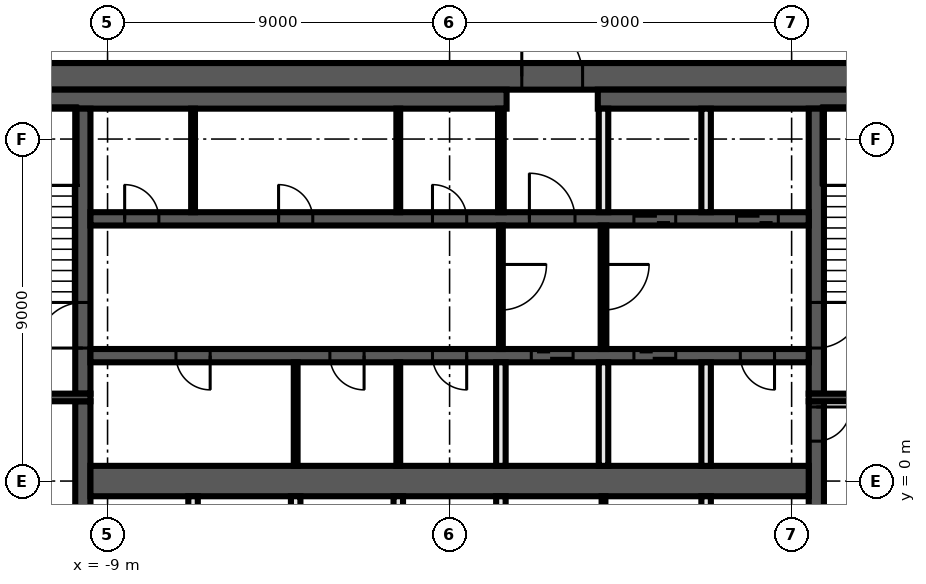
"""IFC4 building model, lengths in metres.
Left out: names, types, materials, properties, quantities, classifications, styles, units other than length and angle.
Written with IfcOpenShell. Run it as: python <this file> out.ifc"""

import sys

from ifc_helpers import new_model, si_unit, direction, frame, frame_2d, origin, place, context, subcontext, project, spatial, rectangle, extrude, element, fill, save


model = new_model("IFC4")
c1 = context("Model", 3, precision=1e-05, world=origin(), true_north=direction((0.0, 1.0)))
c2 = subcontext(c1, "Body", "Model", "MODEL_VIEW")
j1 = project(units=[si_unit("LENGTHUNIT", "METRE"), si_unit("PLANEANGLEUNIT", "RADIAN")], contexts=[c1])
p1 = place(None, origin())
s1 = spatial("IfcSite", under=j1, at=p1, CompositionType="ELEMENT")
p2 = place(p1, origin())
s2 = spatial("IfcBuilding", under=s1, at=p2, CompositionType="ELEMENT")
p3 = place(p2, frame((0.0, 0.0, 279.0)))
s3 = spatial("IfcBuildingStorey", under=s2, at=p3, CompositionType="ELEMENT", Elevation=279.0)
p4 = place(p3, frame((-14.0, 10.65, 0.0), z_axis=(0.0, 0.0, 1.0), x_axis=(1.0, 0.0, 0.0)))
e1 = element("IfcWall", 1, at=p4, inside=s3, PredefinedType="SHEAR", context=c2, shape_type="SweptSolid", body=[
    extrude(rectangle(XDim=28.0, YDim=0.7, at=frame_2d((14.0, 0.0))), origin(), (0.0, 0.0, 1.0), 3.6),
])
p5 = place(p4, frame((15.9, 0.0, 0.0)))
e2 = element("IfcOpeningElement", 2, at=p5, cuts=e1, PredefinedType="OPENING", context=c2, shape_type="SweptSolid", body=[
    extrude(rectangle(XDim=1.6, YDim=2.1, at=frame_2d((0.8, 1.05))), frame((0.0, 0.36, 0.0), z_axis=(0.0, -1.0, 0.0), x_axis=(1.0, 0.0, 0.0)), (0.0, 0.0, 1.0), 0.72),
])
p6 = place(p3, frame((-13.3, 10.05, 0.0), z_axis=(0.0, 0.0, 1.0), x_axis=(1.0, 0.0, 0.0)))
e3 = element("IfcWall", 3, at=p6, inside=s3, PredefinedType="SHEAR", context=c2, shape_type="SweptSolid", body=[
    extrude(rectangle(XDim=14.8, YDim=0.5, at=frame_2d((7.4, 0.0))), origin(), (0.0, 0.0, 1.0), 3.6),
])
p7 = place(p3, frame((3.9, 10.05, 0.0), z_axis=(0.0, 0.0, 1.0), x_axis=(1.0, 0.0, 0.0)))
e4 = element("IfcWall", 4, at=p7, inside=s3, PredefinedType="SHEAR", context=c2, shape_type="SweptSolid", body=[
    extrude(rectangle(XDim=9.4, YDim=0.5, at=frame_2d((4.7, 0.0))), origin(), (0.0, 0.0, 1.0), 3.6),
])
p8 = place(p3, frame((9.65, 2.1, 0.0), z_axis=(0.0, 0.0, 1.0), x_axis=(0.0, -1.0, 0.0)))
e5 = element("IfcWall", 5, at=p8, inside=s3, PredefinedType="SHEAR", context=c2, shape_type="SweptSolid", body=[
    extrude(rectangle(XDim=4.2, YDim=0.4, at=frame_2d((2.1, 0.0))), origin(), (0.0, 0.0, 1.0), 3.6),
])
p9 = place(p8, frame((0.15, 0.0, 0.0)))
e6 = element("IfcOpeningElement", 6, at=p9, cuts=e5, PredefinedType="OPENING", context=c2, shape_type="SweptSolid", body=[
    extrude(rectangle(XDim=0.9, YDim=2.1, at=frame_2d((0.45, 1.05))), frame((0.0, 0.21, 0.0), z_axis=(0.0, -1.0, 0.0), x_axis=(1.0, 0.0, 0.0)), (0.0, 0.0, 1.0), 0.42),
])
p10 = place(p3, frame((9.65, 9.8, 0.0), z_axis=(0.0, 0.0, 1.0), x_axis=(0.0, -1.0, 0.0)))
e7 = element("IfcWall", 7, at=p10, inside=s3, PredefinedType="SHEAR", context=c2, shape_type="SweptSolid", body=[
    extrude(rectangle(XDim=7.5, YDim=0.4, at=frame_2d((3.75, 0.0))), origin(), (0.0, 0.0, 1.0), 3.6),
])
p11 = place(p10, frame((5.1, 0.0, 0.0)))
e8 = element("IfcOpeningElement", 8, at=p11, cuts=e7, PredefinedType="OPENING", context=c2, shape_type="SweptSolid", body=[
    extrude(rectangle(XDim=1.2, YDim=2.1, at=frame_2d((0.6, 1.05))), frame((0.0, 0.21, 0.0), z_axis=(0.0, -1.0, 0.0), x_axis=(1.0, 0.0, 0.0)), (0.0, 0.0, 1.0), 0.42),
])
p12 = place(p3, frame((-9.65, -2.1, 0.0), z_axis=(0.0, 0.0, 1.0), x_axis=(0.0, 1.0, 0.0)))
e9 = element("IfcWall", 9, at=p12, inside=s3, PredefinedType="SHEAR", context=c2, shape_type="SweptSolid", body=[
    extrude(rectangle(XDim=4.2, YDim=0.4, at=frame_2d((2.1, 0.0))), origin(), (0.0, 0.0, 1.0), 3.6),
])
p13 = place(p3, frame((-9.65, 2.3, 0.0), z_axis=(0.0, 0.0, 1.0), x_axis=(0.0, 1.0, 0.0)))
e10 = element("IfcWall", 10, at=p13, inside=s3, PredefinedType="SHEAR", context=c2, shape_type="SweptSolid", body=[
    extrude(rectangle(XDim=7.5, YDim=0.4, at=frame_2d((3.75, 0.0))), origin(), (0.0, 0.0, 1.0), 3.6),
])
p14 = place(p13, frame((1.2, 0.0, 0.0)))
e11 = element("IfcOpeningElement", 11, at=p14, cuts=e10, PredefinedType="OPENING", context=c2, shape_type="SweptSolid", body=[
    extrude(rectangle(XDim=1.2, YDim=2.1, at=frame_2d((0.6, 1.05))), frame((0.0, 0.21, 0.0), z_axis=(0.0, -1.0, 0.0), x_axis=(1.0, 0.0, 0.0)), (0.0, 0.0, 1.0), 0.42),
])
for number, where, z_axis, x_axis in (
    (12, (9.45, 2.2, 0.0), (0.0, 0.0, 1.0), (1.0, 0.0, 0.0)),
    (13, (-9.45, 2.2, 0.0), (0.0, 0.0, 1.0), (-1.0, 0.0, 0.0)),
):
    element("IfcWall", number, at=place(p3, frame(where, z_axis=z_axis, x_axis=x_axis)), inside=s3, PredefinedType="SHEAR", context=c2, shape_type="SweptSolid", body=[
        extrude(rectangle(XDim=3.35, YDim=0.2, at=frame_2d((1.675, 0.0))), origin(), (0.0, 0.0, 1.0), 3.6),
    ])
p15 = place(p3, frame((-9.45, 6.9, 0.0), z_axis=(0.0, 0.0, 1.0), x_axis=(1.0, 0.0, 0.0)))
e14 = element("IfcWall", 14, at=p15, inside=s3, PredefinedType="SHEAR", context=c2, shape_type="SweptSolid", body=[
    extrude(rectangle(XDim=18.9, YDim=0.35, at=frame_2d((9.45, 0.0))), origin(), (0.0, 0.0, 1.0), 3.6),
])
p16 = place(p15, frame((11.55, 0.0, 0.0)))
e15 = element("IfcOpeningElement", 15, at=p16, cuts=e14, PredefinedType="OPENING", context=c2, shape_type="SweptSolid", body=[
    extrude(rectangle(XDim=1.2, YDim=2.1, at=frame_2d((0.6, 1.05))), frame((0.0, 0.185, 0.0), z_axis=(0.0, -1.0, 0.0), x_axis=(1.0, 0.0, 0.0)), (0.0, 0.0, 1.0), 0.37),
])
p17 = place(p15, frame((14.3, 0.0, 0.0)))
e16 = element("IfcOpeningElement", 16, at=p17, cuts=e14, PredefinedType="OPENING", context=c2, shape_type="SweptSolid", body=[
    extrude(rectangle(XDim=1.1, YDim=2.1, at=frame_2d((0.55, 1.05))), frame((0.0, 0.185, 0.0), z_axis=(0.0, -1.0, 0.0), x_axis=(1.0, 0.0, 0.0)), (0.0, 0.0, 1.0), 0.37),
])
p18 = place(p15, frame((17.0, 0.0, 0.0)))
e17 = element("IfcOpeningElement", 17, at=p18, cuts=e14, PredefinedType="OPENING", context=c2, shape_type="SweptSolid", body=[
    extrude(rectangle(XDim=1.1, YDim=2.1, at=frame_2d((0.55, 1.05))), frame((0.0, 0.185, 0.0), z_axis=(0.0, -1.0, 0.0), x_axis=(1.0, 0.0, 0.0)), (0.0, 0.0, 1.0), 0.37),
])
p19 = place(p15, frame((0.9, 0.0, 0.0)))
e18 = element("IfcOpeningElement", 18, at=p19, cuts=e14, PredefinedType="OPENING", context=c2, shape_type="SweptSolid", body=[
    extrude(rectangle(XDim=0.9, YDim=2.1, at=frame_2d((0.45, 1.05))), frame((0.0, 0.185, 0.0), z_axis=(0.0, -1.0, 0.0), x_axis=(1.0, 0.0, 0.0)), (0.0, 0.0, 1.0), 0.37),
])
p20 = place(p15, frame((4.95, 0.0, 0.0)))
e19 = element("IfcOpeningElement", 19, at=p20, cuts=e14, PredefinedType="OPENING", context=c2, shape_type="SweptSolid", body=[
    extrude(rectangle(XDim=0.9, YDim=2.1, at=frame_2d((0.45, 1.05))), frame((0.0, 0.185, 0.0), z_axis=(0.0, -1.0, 0.0), x_axis=(1.0, 0.0, 0.0)), (0.0, 0.0, 1.0), 0.37),
])
p21 = place(p15, frame((9.0, 0.0, 0.0)))
e20 = element("IfcOpeningElement", 20, at=p21, cuts=e14, PredefinedType="OPENING", context=c2, shape_type="SweptSolid", body=[
    extrude(rectangle(XDim=0.9, YDim=2.1, at=frame_2d((0.45, 1.05))), frame((0.0, 0.185, 0.0), z_axis=(0.0, -1.0, 0.0), x_axis=(1.0, 0.0, 0.0)), (0.0, 0.0, 1.0), 0.37),
])
p22 = place(p3, frame((9.45, 3.3, 0.0), z_axis=(0.0, 0.0, 1.0), x_axis=(-1.0, 0.0, 0.0)))
e21 = element("IfcWall", 21, at=p22, inside=s3, PredefinedType="SHEAR", context=c2, shape_type="SweptSolid", body=[
    extrude(rectangle(XDim=18.9, YDim=0.35, at=frame_2d((9.45, 0.0))), origin(), (0.0, 0.0, 1.0), 3.6),
])
p23 = place(p22, frame((6.2, 0.0, 0.0)))
e22 = element("IfcOpeningElement", 22, at=p23, cuts=e21, PredefinedType="OPENING", context=c2, shape_type="SweptSolid", body=[
    extrude(rectangle(XDim=1.1, YDim=2.1, at=frame_2d((0.55, 1.05))), frame((0.0, 0.185, 0.0), z_axis=(0.0, -1.0, 0.0), x_axis=(1.0, 0.0, 0.0)), (0.0, 0.0, 1.0), 0.37),
])
p24 = place(p22, frame((3.5, 0.0, 0.0)))
e23 = element("IfcOpeningElement", 23, at=p24, cuts=e21, PredefinedType="OPENING", context=c2, shape_type="SweptSolid", body=[
    extrude(rectangle(XDim=1.1, YDim=2.1, at=frame_2d((0.55, 1.05))), frame((0.0, 0.185, 0.0), z_axis=(0.0, -1.0, 0.0), x_axis=(1.0, 0.0, 0.0)), (0.0, 0.0, 1.0), 0.37),
])
p25 = place(p22, frame((0.9, 0.0, 0.0)))
e24 = element("IfcOpeningElement", 24, at=p25, cuts=e21, PredefinedType="OPENING", context=c2, shape_type="SweptSolid", body=[
    extrude(rectangle(XDim=0.9, YDim=2.1, at=frame_2d((0.45, 1.05))), frame((0.0, 0.185, 0.0), z_axis=(0.0, -1.0, 0.0), x_axis=(1.0, 0.0, 0.0)), (0.0, 0.0, 1.0), 0.37),
])
p26 = place(p22, frame((15.75, 0.0, 0.0)))
e25 = element("IfcOpeningElement", 25, at=p26, cuts=e21, PredefinedType="OPENING", context=c2, shape_type="SweptSolid", body=[
    extrude(rectangle(XDim=0.9, YDim=2.1, at=frame_2d((0.45, 1.05))), frame((0.0, 0.185, 0.0), z_axis=(0.0, -1.0, 0.0), x_axis=(1.0, 0.0, 0.0)), (0.0, 0.0, 1.0), 0.37),
])
p27 = place(p22, frame((11.7, 0.0, 0.0)))
e26 = element("IfcOpeningElement", 26, at=p27, cuts=e21, PredefinedType="OPENING", context=c2, shape_type="SweptSolid", body=[
    extrude(rectangle(XDim=0.9, YDim=2.1, at=frame_2d((0.45, 1.05))), frame((0.0, 0.185, 0.0), z_axis=(0.0, -1.0, 0.0), x_axis=(1.0, 0.0, 0.0)), (0.0, 0.0, 1.0), 0.37),
])
p28 = place(p22, frame((9.0, 0.0, 0.0)))
e27 = element("IfcOpeningElement", 27, at=p28, cuts=e21, PredefinedType="OPENING", context=c2, shape_type="SweptSolid", body=[
    extrude(rectangle(XDim=0.9, YDim=2.1, at=frame_2d((0.45, 1.05))), frame((0.0, 0.185, 0.0), z_axis=(0.0, -1.0, 0.0), x_axis=(1.0, 0.0, 0.0)), (0.0, 0.0, 1.0), 0.37),
])
p29 = place(p3, frame((-9.45, 0.0, 0.0), z_axis=(0.0, 0.0, 1.0), x_axis=(1.0, 0.0, 0.0)))
e28 = element("IfcWall", 28, at=p29, inside=s3, PredefinedType="SHEAR", context=c2, shape_type="SweptSolid", body=[
    extrude(rectangle(XDim=18.9, YDim=0.8, at=frame_2d((9.45, 0.0))), origin(), (0.0, 0.0, 1.0), 3.6),
])
for number, where, z_axis, x_axis in (
    (29, (6.75, -3.125, 0.0), (0.0, 0.0, 1.0), (0.0, 1.0, 0.0)),
    (30, (6.75, 0.4, 0.0), (0.0, 0.0, 1.0), (0.0, 1.0, 0.0)),
    (31, (6.75, 7.075, 0.0), (0.0, 0.0, 1.0), (0.0, 1.0, 0.0)),
):
    element("IfcWall", number, at=place(p3, frame(where, z_axis=z_axis, x_axis=x_axis)), inside=s3, PredefinedType="SOLIDWALL", context=c2, shape_type="SweptSolid", body=[
        extrude(rectangle(XDim=2.725, YDim=0.25, at=frame_2d((1.363, 0.0))), origin(), (0.0, 0.0, 1.0), 3.6),
    ])
p30 = place(p3, frame((4.05, 6.725, 0.0), z_axis=(0.0, 0.0, 1.0), x_axis=(0.0, -1.0, 0.0)))
e32 = element("IfcWall", 32, at=p30, inside=s3, PredefinedType="PARTITIONING", context=c2, shape_type="SweptSolid", body=[
    extrude(rectangle(XDim=3.25, YDim=0.15, at=frame_2d((1.625, 0.0))), origin(), (0.0, 0.0, 1.0), 3.6),
])
p31 = place(p30, frame((1.025, 0.0, 0.0)))
e33 = element("IfcOpeningElement", 33, at=p31, cuts=e32, PredefinedType="OPENING", context=c2, shape_type="SweptSolid", body=[
    extrude(rectangle(XDim=1.2, YDim=2.1, at=frame_2d((0.6, 1.05))), frame((0.0, 0.085, 0.0), z_axis=(0.0, -1.0, 0.0), x_axis=(1.0, 0.0, 0.0)), (0.0, 0.0, 1.0), 0.17),
])
p32 = place(p3, frame((4.05, -3.125, 0.0), z_axis=(0.0, 0.0, 1.0), x_axis=(0.0, 1.0, 0.0)))
e34 = element("IfcWall", 34, at=p32, inside=s3, PredefinedType="PARTITIONING", context=c2, shape_type="SweptSolid", body=[
    extrude(rectangle(XDim=2.725, YDim=0.1, at=frame_2d((1.363, 0.0))), origin(), (0.0, 0.0, 1.0), 3.6),
])
for number, where, z_axis, x_axis in (
    (35, (4.05, 0.4, 0.0), (0.0, 0.0, 1.0), (0.0, 1.0, 0.0)),
    (36, (4.05, 7.075, 0.0), (0.0, 0.0, 1.0), (0.0, 1.0, 0.0)),
):
    element("IfcWall", number, at=place(p3, frame(where, z_axis=z_axis, x_axis=x_axis)), inside=s3, PredefinedType="SOLIDWALL", context=c2, shape_type="SweptSolid", body=[
        extrude(rectangle(XDim=2.725, YDim=0.25, at=frame_2d((1.363, 0.0))), origin(), (0.0, 0.0, 1.0), 3.6),
    ])
p33 = place(p3, frame((1.35, 7.075, 0.0), z_axis=(0.0, 0.0, 1.0), x_axis=(0.0, 1.0, 0.0)))
e37 = element("IfcWall", 37, at=p33, inside=s3, PredefinedType="PARTITIONING", context=c2, shape_type="SweptSolid", body=[
    extrude(rectangle(XDim=2.725, YDim=0.15, at=frame_2d((1.363, 0.0))), origin(), (0.0, 0.0, 1.0), 3.6),
])
p34 = place(p3, frame((1.35, 6.725, 0.0), z_axis=(0.0, 0.0, 1.0), x_axis=(0.0, -1.0, 0.0)))
e38 = element("IfcWall", 38, at=p34, inside=s3, PredefinedType="PARTITIONING", context=c2, shape_type="SweptSolid", body=[
    extrude(rectangle(XDim=3.25, YDim=0.1, at=frame_2d((1.625, 0.0))), origin(), (0.0, 0.0, 1.0), 3.6),
])
p35 = place(p34, frame((1.025, 0.0, 0.0)))
e39 = element("IfcOpeningElement", 39, at=p35, cuts=e38, PredefinedType="OPENING", context=c2, shape_type="SweptSolid", body=[
    extrude(rectangle(XDim=1.2, YDim=2.1, at=frame_2d((0.6, 1.05))), frame((0.0, 0.06, 0.0), z_axis=(0.0, -1.0, 0.0), x_axis=(1.0, 0.0, 0.0)), (0.0, 0.0, 1.0), 0.12),
])
for number, where, z_axis, x_axis in (
    (40, (1.35, -3.125, 0.0), (0.0, 0.0, 1.0), (0.0, 1.0, 0.0)),
    (41, (1.35, 0.4, 0.0), (0.0, 0.0, 1.0), (0.0, 1.0, 0.0)),
):
    element("IfcWall", number, at=place(p3, frame(where, z_axis=z_axis, x_axis=x_axis)), inside=s3, PredefinedType="SOLIDWALL", context=c2, shape_type="SweptSolid", body=[
        extrude(rectangle(XDim=2.725, YDim=0.25, at=frame_2d((1.363, 0.0))), origin(), (0.0, 0.0, 1.0), 3.6),
    ])
for number, where, z_axis, x_axis in (
    (42, (-1.35, 0.4, 0.0), (0.0, 0.0, 1.0), (0.0, 1.0, 0.0)),
    (43, (-1.35, 7.075, 0.0), (0.0, 0.0, 1.0), (0.0, 1.0, 0.0)),
):
    element("IfcWall", number, at=place(p3, frame(where, z_axis=z_axis, x_axis=x_axis)), inside=s3, PredefinedType="PARTITIONING", context=c2, shape_type="SweptSolid", body=[
        extrude(rectangle(XDim=2.725, YDim=0.1, at=frame_2d((1.363, 0.0))), origin(), (0.0, 0.0, 1.0), 3.6),
    ])
p36 = place(p3, frame((-1.35, -3.125, 0.0), z_axis=(0.0, 0.0, 1.0), x_axis=(0.0, 1.0, 0.0)))
e44 = element("IfcWall", 44, at=p36, inside=s3, PredefinedType="SOLIDWALL", context=c2, shape_type="SweptSolid", body=[
    extrude(rectangle(XDim=2.725, YDim=0.25, at=frame_2d((1.363, 0.0))), origin(), (0.0, 0.0, 1.0), 3.6),
])
p37 = place(p3, frame((-4.05, 0.4, 0.0), z_axis=(0.0, 0.0, 1.0), x_axis=(0.0, 1.0, 0.0)))
e45 = element("IfcWall", 45, at=p37, inside=s3, PredefinedType="PARTITIONING", context=c2, shape_type="SweptSolid", body=[
    extrude(rectangle(XDim=2.725, YDim=0.1, at=frame_2d((1.363, 0.0))), origin(), (0.0, 0.0, 1.0), 3.6),
])
p38 = place(p3, frame((-4.05, -3.125, 0.0), z_axis=(0.0, 0.0, 1.0), x_axis=(0.0, 1.0, 0.0)))
e46 = element("IfcWall", 46, at=p38, inside=s3, PredefinedType="SOLIDWALL", context=c2, shape_type="SweptSolid", body=[
    extrude(rectangle(XDim=2.725, YDim=0.25, at=frame_2d((1.363, 0.0))), origin(), (0.0, 0.0, 1.0), 3.6),
])
p39 = place(p3, frame((-6.75, 7.075, 0.0), z_axis=(0.0, 0.0, 1.0), x_axis=(0.0, 1.0, 0.0)))
e47 = element("IfcWall", 47, at=p39, inside=s3, PredefinedType="PARTITIONING", context=c2, shape_type="SweptSolid", body=[
    extrude(rectangle(XDim=2.725, YDim=0.1, at=frame_2d((1.363, 0.0))), origin(), (0.0, 0.0, 1.0), 3.6),
])
p40 = place(p3, frame((-6.75, -3.125, 0.0), z_axis=(0.0, 0.0, 1.0), x_axis=(0.0, 1.0, 0.0)))
e48 = element("IfcWall", 48, at=p40, inside=s3, PredefinedType="SOLIDWALL", context=c2, shape_type="SweptSolid", body=[
    extrude(rectangle(XDim=2.725, YDim=0.25, at=frame_2d((1.363, 0.0))), origin(), (0.0, 0.0, 1.0), 3.6),
])
p41 = place(p9, origin())
e49 = element("IfcDoor", 49, at=p41, inside=s3, OperationType="SINGLE_SWING_RIGHT", PredefinedType="DOOR", context=c2, shape_type="SweptSolid", body=[
    extrude(rectangle(XDim=0.9, YDim=2.1, at=frame_2d((0.45, 1.05))), frame((0.0, 0.025, 0.0), z_axis=(0.0, -1.0, 0.0), x_axis=(1.0, 0.0, 0.0)), (0.0, 0.0, 1.0), 0.05),
])
fill(e6, e49)
p42 = place(p5, origin())
e50 = element("IfcDoor", 50, at=p42, inside=s3, OperationType="DOUBLE_DOOR_SINGLE_SWING", PredefinedType="DOOR", context=c2, shape_type="SweptSolid", body=[
    extrude(rectangle(XDim=1.6, YDim=2.1, at=frame_2d((0.8, 1.05))), frame((0.0, 0.025, 0.0), z_axis=(0.0, -1.0, 0.0), x_axis=(1.0, 0.0, 0.0)), (0.0, 0.0, 1.0), 0.05),
])
fill(e2, e50)
p43 = place(p16, origin())
e51 = element("IfcDoor", 51, at=p43, inside=s3, OperationType="SINGLE_SWING_LEFT", PredefinedType="DOOR", context=c2, shape_type="SweptSolid", body=[
    extrude(rectangle(XDim=1.2, YDim=2.1, at=frame_2d((0.6, 1.05))), frame((0.0, 0.025, 0.0), z_axis=(0.0, -1.0, 0.0), x_axis=(1.0, 0.0, 0.0)), (0.0, 0.0, 1.0), 0.05),
])
fill(e15, e51)
p44 = place(p17, origin())
e52 = element("IfcDoor", 52, at=p44, inside=s3, OperationType="DOUBLE_DOOR_SLIDING", PredefinedType="DOOR", context=c2, shape_type="SweptSolid", body=[
    extrude(rectangle(XDim=1.1, YDim=2.1, at=frame_2d((0.55, 1.05))), frame((0.0, 0.025, 0.0), z_axis=(0.0, -1.0, 0.0), x_axis=(1.0, 0.0, 0.0)), (0.0, 0.0, 1.0), 0.05),
])
fill(e16, e52)
p45 = place(p18, origin())
e53 = element("IfcDoor", 53, at=p45, inside=s3, OperationType="DOUBLE_DOOR_SLIDING", PredefinedType="DOOR", context=c2, shape_type="SweptSolid", body=[
    extrude(rectangle(XDim=1.1, YDim=2.1, at=frame_2d((0.55, 1.05))), frame((0.0, 0.025, 0.0), z_axis=(0.0, -1.0, 0.0), x_axis=(1.0, 0.0, 0.0)), (0.0, 0.0, 1.0), 0.05),
])
fill(e17, e53)
p46 = place(p23, origin())
e54 = element("IfcDoor", 54, at=p46, inside=s3, OperationType="DOUBLE_DOOR_SLIDING", PredefinedType="DOOR", context=c2, shape_type="SweptSolid", body=[
    extrude(rectangle(XDim=1.1, YDim=2.1, at=frame_2d((0.55, 1.05))), frame((0.0, 0.025, 0.0), z_axis=(0.0, -1.0, 0.0), x_axis=(1.0, 0.0, 0.0)), (0.0, 0.0, 1.0), 0.05),
])
fill(e22, e54)
p47 = place(p24, origin())
e55 = element("IfcDoor", 55, at=p47, inside=s3, OperationType="DOUBLE_DOOR_SLIDING", PredefinedType="DOOR", context=c2, shape_type="SweptSolid", body=[
    extrude(rectangle(XDim=1.1, YDim=2.1, at=frame_2d((0.55, 1.05))), frame((0.0, 0.025, 0.0), z_axis=(0.0, -1.0, 0.0), x_axis=(1.0, 0.0, 0.0)), (0.0, 0.0, 1.0), 0.05),
])
fill(e23, e55)
p48 = place(p25, origin())
e56 = element("IfcDoor", 56, at=p48, inside=s3, OperationType="SINGLE_SWING_LEFT", PredefinedType="DOOR", context=c2, shape_type="SweptSolid", body=[
    extrude(rectangle(XDim=0.9, YDim=2.1, at=frame_2d((0.45, 1.05))), frame((0.0, 0.025, 0.0), z_axis=(0.0, -1.0, 0.0), x_axis=(1.0, 0.0, 0.0)), (0.0, 0.0, 1.0), 0.05),
])
fill(e24, e56)
p49 = place(p19, origin())
e57 = element("IfcDoor", 57, at=p49, inside=s3, OperationType="SINGLE_SWING_RIGHT", PredefinedType="DOOR", context=c2, shape_type="SweptSolid", body=[
    extrude(rectangle(XDim=0.9, YDim=2.1, at=frame_2d((0.45, 1.05))), frame((0.0, 0.025, 0.0), z_axis=(0.0, -1.0, 0.0), x_axis=(1.0, 0.0, 0.0)), (0.0, 0.0, 1.0), 0.05),
])
fill(e18, e57)
p50 = place(p20, origin())
e58 = element("IfcDoor", 58, at=p50, inside=s3, OperationType="SINGLE_SWING_LEFT", PredefinedType="DOOR", context=c2, shape_type="SweptSolid", body=[
    extrude(rectangle(XDim=0.9, YDim=2.1, at=frame_2d((0.45, 1.05))), frame((0.0, 0.025, 0.0), z_axis=(0.0, -1.0, 0.0), x_axis=(1.0, 0.0, 0.0)), (0.0, 0.0, 1.0), 0.05),
])
fill(e19, e58)
p51 = place(p21, origin())
e59 = element("IfcDoor", 59, at=p51, inside=s3, OperationType="SINGLE_SWING_RIGHT", PredefinedType="DOOR", context=c2, shape_type="SweptSolid", body=[
    extrude(rectangle(XDim=0.9, YDim=2.1, at=frame_2d((0.45, 1.05))), frame((0.0, 0.025, 0.0), z_axis=(0.0, -1.0, 0.0), x_axis=(1.0, 0.0, 0.0)), (0.0, 0.0, 1.0), 0.05),
])
fill(e20, e59)
p52 = place(p26, origin())
e60 = element("IfcDoor", 60, at=p52, inside=s3, OperationType="SINGLE_SWING_LEFT", PredefinedType="DOOR", context=c2, shape_type="SweptSolid", body=[
    extrude(rectangle(XDim=0.9, YDim=2.1, at=frame_2d((0.45, 1.05))), frame((0.0, 0.025, 0.0), z_axis=(0.0, -1.0, 0.0), x_axis=(1.0, 0.0, 0.0)), (0.0, 0.0, 1.0), 0.05),
])
fill(e25, e60)
p53 = place(p27, origin())
e61 = element("IfcDoor", 61, at=p53, inside=s3, OperationType="SINGLE_SWING_RIGHT", PredefinedType="DOOR", context=c2, shape_type="SweptSolid", body=[
    extrude(rectangle(XDim=0.9, YDim=2.1, at=frame_2d((0.45, 1.05))), frame((0.0, 0.025, 0.0), z_axis=(0.0, -1.0, 0.0), x_axis=(1.0, 0.0, 0.0)), (0.0, 0.0, 1.0), 0.05),
])
fill(e26, e61)
p54 = place(p28, origin())
e62 = element("IfcDoor", 62, at=p54, inside=s3, OperationType="SINGLE_SWING_LEFT", PredefinedType="DOOR", context=c2, shape_type="SweptSolid", body=[
    extrude(rectangle(XDim=0.9, YDim=2.1, at=frame_2d((0.45, 1.05))), frame((0.0, 0.025, 0.0), z_axis=(0.0, -1.0, 0.0), x_axis=(1.0, 0.0, 0.0)), (0.0, 0.0, 1.0), 0.05),
])
fill(e27, e62)
p55 = place(p11, origin())
e63 = element("IfcDoor", 63, at=p55, inside=s3, OperationType="SINGLE_SWING_LEFT", PredefinedType="DOOR", context=c2, shape_type="SweptSolid", body=[
    extrude(rectangle(XDim=1.2, YDim=2.1, at=frame_2d((0.6, 1.05))), frame((0.0, 0.025, 0.0), z_axis=(0.0, -1.0, 0.0), x_axis=(1.0, 0.0, 0.0)), (0.0, 0.0, 1.0), 0.05),
])
fill(e8, e63)
p56 = place(p14, origin())
e64 = element("IfcDoor", 64, at=p56, inside=s3, OperationType="SINGLE_SWING_RIGHT", PredefinedType="DOOR", context=c2, shape_type="SweptSolid", body=[
    extrude(rectangle(XDim=1.2, YDim=2.1, at=frame_2d((0.6, 1.05))), frame((0.0, 0.025, 0.0), z_axis=(0.0, -1.0, 0.0), x_axis=(1.0, 0.0, 0.0)), (0.0, 0.0, 1.0), 0.05),
])
fill(e11, e64)
p57 = place(p35, origin())
e65 = element("IfcDoor", 65, at=p57, inside=s3, OperationType="SINGLE_SWING_LEFT", PredefinedType="DOOR", context=c2, shape_type="SweptSolid", body=[
    extrude(rectangle(XDim=1.2, YDim=2.1, at=frame_2d((0.6, 1.05))), frame((0.0, 0.025, 0.0), z_axis=(0.0, -1.0, 0.0), x_axis=(1.0, 0.0, 0.0)), (0.0, 0.0, 1.0), 0.05),
])
fill(e39, e65)
p58 = place(p31, origin())
e66 = element("IfcDoor", 66, at=p58, inside=s3, OperationType="SINGLE_SWING_RIGHT", PredefinedType="DOOR", context=c2, shape_type="SweptSolid", body=[
    extrude(rectangle(XDim=1.2, YDim=2.1, at=frame_2d((0.6, 1.05))), frame((0.0, 0.025, 0.0), z_axis=(0.0, -1.0, 0.0), x_axis=(1.0, 0.0, 0.0)), (0.0, 0.0, 1.0), 0.05),
])
fill(e33, e66)
save(model, sys.argv[1])
